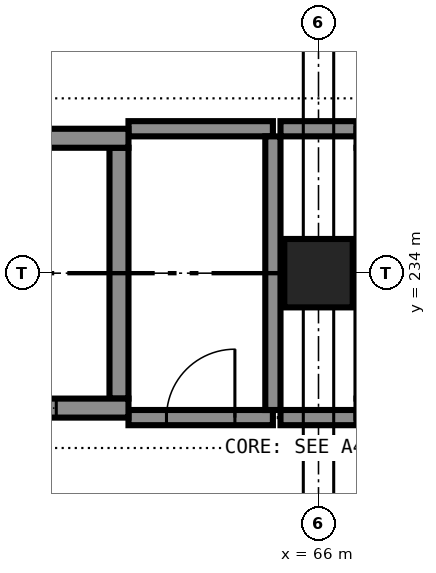
"""IFC4 building model, lengths in metres.
Left out: names, types, materials, properties, quantities, classifications, styles, units other than length and angle.
Written with IfcOpenShell. Run it as: python <this file> out.ifc"""

import sys

from ifc_helpers import new_model, si_unit, direction, frame, frame_2d, origin, origin_2d, place, context, subcontext, project, spatial, rectangle, extrude, element, fill, save


model = new_model("IFC4")
c1 = context("Model", 3, precision=1e-05, world=origin(), true_north=direction((0.0, 1.0)))
c2 = subcontext(c1, "Body", "Model", "MODEL_VIEW")
j1 = project(units=[si_unit("LENGTHUNIT", "METRE"), si_unit("PLANEANGLEUNIT", "RADIAN")], contexts=[c1])
p1 = place(None, origin())
s1 = spatial("IfcSite", under=j1, at=p1, CompositionType="ELEMENT")
p2 = place(p1, origin())
s2 = spatial("IfcBuilding", under=s1, at=p2, CompositionType="ELEMENT")
p3 = place(p2, frame((0.0, 0.0, 31.8)))
s3 = spatial("IfcBuildingStorey", under=s2, at=p3, CompositionType="ELEMENT", Elevation=31.8)
p4 = place(p3, frame((66.0, 234.0, 0.0), z_axis=(0.0, 0.0, 1.0), x_axis=(1.0, 0.0, 0.0)))
e1 = element("IfcColumn", 1, at=p4, inside=s3, PredefinedType="COLUMN", context=c2, shape_type="SweptSolid", body=[
    extrude(rectangle(XDim=0.9, YDim=0.9, at=origin_2d()), origin(), (0.0, 0.0, 1.0), 3.6),
])
p5 = place(p3, frame((60.5, 232.225, 0.0), z_axis=(0.0, 0.0, 1.0), x_axis=(1.0, 0.0, 0.0)))
e2 = element("IfcWall", 2, at=p5, inside=s3, PredefinedType="SHEAR", context=c2, shape_type="SweptSolid", body=[
    extrude(rectangle(XDim=3.0, YDim=0.25, at=frame_2d((1.5, 0.0))), origin(), (0.0, 0.0, 1.0), 3.6),
])
p6 = place(p5, frame((0.95, 0.0, 0.0)))
e3 = element("IfcOpeningElement", 3, at=p6, cuts=e2, PredefinedType="OPENING", context=c2, shape_type="SweptSolid", body=[
    extrude(rectangle(XDim=1.1, YDim=2.1, at=frame_2d((0.55, 1.05))), frame((0.0, 0.135, 0.0), z_axis=(0.0, -1.0, 0.0), x_axis=(1.0, 0.0, 0.0)), (0.0, 0.0, 1.0), 0.27),
])
p7 = place(p3, frame((60.5, 235.775, 0.0), z_axis=(0.0, 0.0, 1.0), x_axis=(1.0, 0.0, 0.0)))
e4 = element("IfcWall", 4, at=p7, inside=s3, PredefinedType="SHEAR", context=c2, shape_type="SweptSolid", body=[
    extrude(rectangle(XDim=3.0, YDim=0.25, at=frame_2d((1.5, 0.0))), origin(), (0.0, 0.0, 1.0), 3.6),
])
p8 = place(p3, frame((63.375, 232.35, 0.0), z_axis=(0.0, 0.0, 1.0), x_axis=(0.0, 1.0, 0.0)))
e5 = element("IfcWall", 5, at=p8, inside=s3, PredefinedType="SHEAR", context=c2, shape_type="SweptSolid", body=[
    extrude(rectangle(XDim=3.3, YDim=0.25, at=frame_2d((1.65, 0.0))), origin(), (0.0, 0.0, 1.0), 3.6),
])
p9 = place(p3, frame((63.5, 232.1, 0.0), z_axis=(0.0, 0.0, 1.0), x_axis=(1.0, 0.0, 0.0)))
e6 = element("IfcWall", 6, at=p9, inside=s3, PredefinedType="PARTITIONING", context=c2, shape_type="SweptSolid", body=[
    extrude(rectangle(XDim=1.9, YDim=0.2, at=frame_2d((0.95, 0.0))), origin(), (0.0, 0.0, 1.0), 3.4),
])
p10 = place(p9, frame((0.5, 0.0, 0.0)))
e7 = element("IfcOpeningElement", 7, at=p10, cuts=e6, PredefinedType="OPENING", context=c2, shape_type="SweptSolid", body=[
    extrude(rectangle(XDim=0.9, YDim=2.1, at=frame_2d((0.45, 1.05))), frame((0.0, 0.11, 0.0), z_axis=(0.0, -1.0, 0.0), x_axis=(1.0, 0.0, 0.0)), (0.0, 0.0, 1.0), 0.22),
])
p11 = place(p3, frame((65.5, 232.1, 0.0), z_axis=(0.0, 0.0, 1.0), x_axis=(1.0, 0.0, 0.0)))
e8 = element("IfcWall", 8, at=p11, inside=s3, PredefinedType="PARTITIONING", context=c2, shape_type="SweptSolid", body=[
    extrude(rectangle(XDim=1.0, YDim=0.2, at=frame_2d((0.5, 0.0))), origin(), (0.0, 0.0, 1.0), 3.4),
])
p12 = place(p3, frame((63.5, 235.9, 0.0), z_axis=(0.0, 0.0, 1.0), x_axis=(1.0, 0.0, 0.0)))
e9 = element("IfcWall", 9, at=p12, inside=s3, PredefinedType="PARTITIONING", context=c2, shape_type="SweptSolid", body=[
    extrude(rectangle(XDim=1.9, YDim=0.2, at=frame_2d((0.95, 0.0))), origin(), (0.0, 0.0, 1.0), 3.4),
])
p13 = place(p3, frame((65.5, 235.9, 0.0), z_axis=(0.0, 0.0, 1.0), x_axis=(1.0, 0.0, 0.0)))
e10 = element("IfcWall", 10, at=p13, inside=s3, PredefinedType="PARTITIONING", context=c2, shape_type="SweptSolid", body=[
    extrude(rectangle(XDim=1.0, YDim=0.2, at=frame_2d((0.5, 0.0))), origin(), (0.0, 0.0, 1.0), 3.4),
])
p14 = place(p3, frame((65.4, 232.2, 0.0), z_axis=(0.0, 0.0, 1.0), x_axis=(0.0, 1.0, 0.0)))
e11 = element("IfcWall", 11, at=p14, inside=s3, PredefinedType="PARTITIONING", context=c2, shape_type="SweptSolid", body=[
    extrude(rectangle(XDim=3.6, YDim=0.2, at=frame_2d((1.8, 0.0))), origin(), (0.0, 0.0, 1.0), 3.4),
])
p15 = place(p10, origin())
e12 = element("IfcDoor", 12, at=p15, inside=s3, OperationType="SINGLE_SWING_RIGHT", PredefinedType="DOOR", context=c2, shape_type="SweptSolid", body=[
    extrude(rectangle(XDim=0.9, YDim=2.1, at=frame_2d((0.45, 1.05))), frame((0.0, 0.025, 0.0), z_axis=(0.0, -1.0, 0.0), x_axis=(1.0, 0.0, 0.0)), (0.0, 0.0, 1.0), 0.05),
])
fill(e7, e12)
p16 = place(p6, origin())
e13 = element("IfcDoor", 13, at=p16, inside=s3, OperationType="SLIDING_TO_LEFT", PredefinedType="DOOR", context=c2, shape_type="SweptSolid", body=[
    extrude(rectangle(XDim=1.1, YDim=2.1, at=frame_2d((0.55, 1.05))), frame((0.0, 0.025, 0.0), z_axis=(0.0, -1.0, 0.0), x_axis=(1.0, 0.0, 0.0)), (0.0, 0.0, 1.0), 0.05),
])
fill(e3, e13)
save(model, sys.argv[1])
